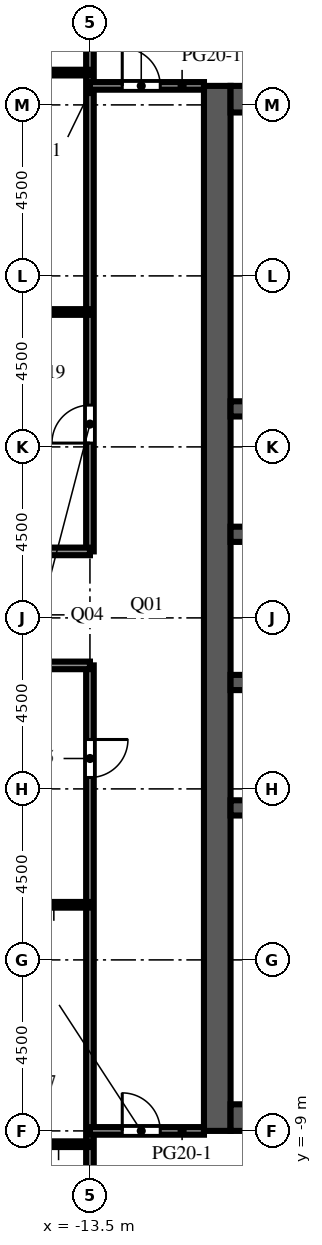
"""IFC4 building model, lengths in metres.
Left out: names, types, materials, properties, quantities, classifications, styles, units other than length and angle.
Written with IfcOpenShell. Run it as: python <this file> out.ifc"""

import sys

from ifc_helpers import new_model, si_unit, direction, frame, frame_2d, origin, place, context, subcontext, project, spatial, rectangle, extrude, element, fill, save


model = new_model("IFC4")
c1 = context("Model", 3, precision=1e-05, world=origin(), true_north=direction((0.0, 1.0)))
c2 = subcontext(c1, "Body", "Model", "MODEL_VIEW")
j1 = project(units=[si_unit("LENGTHUNIT", "METRE"), si_unit("PLANEANGLEUNIT", "RADIAN")], contexts=[c1])
p1 = place(None, origin())
s1 = spatial("IfcSite", under=j1, at=p1, CompositionType="ELEMENT")
p2 = place(p1, origin())
s2 = spatial("IfcBuilding", under=s1, at=p2, CompositionType="ELEMENT")
p3 = place(p2, frame((0.0, 0.0, 231.6)))
s3 = spatial("IfcBuildingStorey", under=s2, at=p3, CompositionType="ELEMENT", Elevation=231.6)
p4 = place(p3, frame((-10.15, -9.0, 0.0), z_axis=(0.0, 0.0, 1.0), x_axis=(0.0, 1.0, 0.0)))
e1 = element("IfcWall", 1, at=p4, inside=s3, PredefinedType="SHEAR", context=c2, shape_type="SweptSolid", body=[
    extrude(rectangle(XDim=27.5, YDim=0.7, at=frame_2d((13.75, 0.0))), origin(), (0.0, 0.0, 1.0), 4.1),
])
p5 = place(p4, frame((12.55, 0.0, 0.0)))
e2 = element("IfcOpeningElement", 2, at=p5, cuts=e1, PredefinedType="OPENING", context=c2, shape_type="SweptSolid", body=[
    extrude(rectangle(XDim=2.4, YDim=2.4, at=frame_2d((1.2, 1.2))), frame((0.0, 0.36, 0.0), z_axis=(0.0, -1.0, 0.0), x_axis=(1.0, 0.0, 0.0)), (0.0, 0.0, 1.0), 0.72),
])
p6 = place(p4, frame((6.825, 0.0, 0.0)))
e3 = element("IfcOpeningElement", 3, at=p6, cuts=e1, PredefinedType="OPENING", context=c2, shape_type="SweptSolid", body=[
    extrude(rectangle(XDim=1.2, YDim=2.1, at=frame_2d((0.6, 1.05))), frame((0.0, 0.36, 0.0), z_axis=(0.0, -1.0, 0.0), x_axis=(1.0, 0.0, 0.0)), (0.0, 0.0, 1.0), 0.72),
])
p7 = place(p4, frame((19.475, 0.0, 0.0)))
e4 = element("IfcOpeningElement", 4, at=p7, cuts=e1, PredefinedType="OPENING", context=c2, shape_type="SweptSolid", body=[
    extrude(rectangle(XDim=1.2, YDim=2.1, at=frame_2d((0.6, 1.05))), frame((0.0, 0.36, 0.0), z_axis=(0.0, -1.0, 0.0), x_axis=(1.0, 0.0, 0.0)), (0.0, 0.0, 1.0), 0.72),
])
for number, where, z_axis, x_axis in (
    (5, (-9.8, -8.65, 0.0), (0.0, 0.0, 1.0), (1.0, 0.0, 0.0)),
    (6, (-9.8, 18.15, 0.0), (0.0, 0.0, 1.0), (1.0, 0.0, 0.0)),
):
    element("IfcWall", number, at=place(p3, frame(where, z_axis=z_axis, x_axis=x_axis)), inside=s3, PredefinedType="SHEAR", context=c2, shape_type="SweptSolid", body=[
        extrude(rectangle(XDim=10.6, YDim=0.7, at=frame_2d((5.3, 0.0))), origin(), (0.0, 0.0, 1.0), 4.1),
    ])
p8 = place(p3, frame((-9.8, -0.5, 0.0), z_axis=(0.0, 0.0, 1.0), x_axis=(1.0, 0.0, 0.0)))
e7 = element("IfcWall", 7, at=p8, inside=s3, PredefinedType="SHEAR", context=c2, shape_type="SweptSolid", body=[
    extrude(rectangle(XDim=10.6, YDim=0.4, at=frame_2d((5.3, 0.0))), origin(), (0.0, 0.0, 1.0), 4.1),
])
p9 = place(p3, frame((-9.8, 2.8, 0.0), z_axis=(0.0, 0.0, 1.0), x_axis=(1.0, 0.0, 0.0)))
e8 = element("IfcWall", 8, at=p9, inside=s3, PredefinedType="SHEAR", context=c2, shape_type="SweptSolid", body=[
    extrude(rectangle(XDim=10.6, YDim=0.4, at=frame_2d((5.3, 0.0))), origin(), (0.0, 0.0, 1.0), 4.1),
])
p10 = place(p9, frame((0.688, 0.0, 0.0)))
e9 = element("IfcOpeningElement", 9, at=p10, cuts=e8, PredefinedType="OPENING", context=c2, shape_type="SweptSolid", body=[
    extrude(rectangle(XDim=1.1, YDim=2.1, at=frame_2d((0.55, 1.05))), frame((0.0, 0.21, 0.0), z_axis=(0.0, -1.0, 0.0), x_axis=(1.0, 0.0, 0.0)), (0.0, 0.0, 1.0), 0.42),
])
p11 = place(p9, frame((3.438, 0.0, 0.0)))
e10 = element("IfcOpeningElement", 10, at=p11, cuts=e8, PredefinedType="OPENING", context=c2, shape_type="SweptSolid", body=[
    extrude(rectangle(XDim=1.1, YDim=2.1, at=frame_2d((0.55, 1.05))), frame((0.0, 0.21, 0.0), z_axis=(0.0, -1.0, 0.0), x_axis=(1.0, 0.0, 0.0)), (0.0, 0.0, 1.0), 0.42),
])
p12 = place(p9, frame((6.113, 0.0, 0.0)))
e11 = element("IfcOpeningElement", 11, at=p12, cuts=e8, PredefinedType="OPENING", context=c2, shape_type="SweptSolid", body=[
    extrude(rectangle(XDim=1.0, YDim=2.1, at=frame_2d((0.5, 1.05))), frame((0.0, 0.21, 0.0), z_axis=(0.0, -1.0, 0.0), x_axis=(1.0, 0.0, 0.0)), (0.0, 0.0, 1.0), 0.42),
])
p13 = place(p9, frame((8.863, 0.0, 0.0)))
e12 = element("IfcOpeningElement", 12, at=p13, cuts=e8, PredefinedType="OPENING", context=c2, shape_type="SweptSolid", body=[
    extrude(rectangle(XDim=1.0, YDim=2.1, at=frame_2d((0.5, 1.05))), frame((0.0, 0.21, 0.0), z_axis=(0.0, -1.0, 0.0), x_axis=(1.0, 0.0, 0.0)), (0.0, 0.0, 1.0), 0.42),
])
p14 = place(p3, frame((-9.8, 6.7, 0.0), z_axis=(0.0, 0.0, 1.0), x_axis=(1.0, 0.0, 0.0)))
e13 = element("IfcWall", 13, at=p14, inside=s3, PredefinedType="SHEAR", context=c2, shape_type="SweptSolid", body=[
    extrude(rectangle(XDim=10.6, YDim=0.4, at=frame_2d((5.3, 0.0))), origin(), (0.0, 0.0, 1.0), 4.1),
])
p15 = place(p14, frame((3.438, 0.0, 0.0)))
e14 = element("IfcOpeningElement", 14, at=p15, cuts=e13, PredefinedType="OPENING", context=c2, shape_type="SweptSolid", body=[
    extrude(rectangle(XDim=1.1, YDim=2.1, at=frame_2d((0.55, 1.05))), frame((0.0, 0.21, 0.0), z_axis=(0.0, -1.0, 0.0), x_axis=(1.0, 0.0, 0.0)), (0.0, 0.0, 1.0), 0.42),
])
p16 = place(p14, frame((6.062, 0.0, 0.0)))
e15 = element("IfcOpeningElement", 15, at=p16, cuts=e13, PredefinedType="OPENING", context=c2, shape_type="SweptSolid", body=[
    extrude(rectangle(XDim=1.1, YDim=2.1, at=frame_2d((0.55, 1.05))), frame((0.0, 0.21, 0.0), z_axis=(0.0, -1.0, 0.0), x_axis=(1.0, 0.0, 0.0)), (0.0, 0.0, 1.0), 0.42),
])
p17 = place(p14, frame((8.812, 0.0, 0.0)))
e16 = element("IfcOpeningElement", 16, at=p17, cuts=e13, PredefinedType="OPENING", context=c2, shape_type="SweptSolid", body=[
    extrude(rectangle(XDim=1.1, YDim=2.1, at=frame_2d((0.55, 1.05))), frame((0.0, 0.21, 0.0), z_axis=(0.0, -1.0, 0.0), x_axis=(1.0, 0.0, 0.0)), (0.0, 0.0, 1.0), 0.42),
])
p18 = place(p14, frame((0.738, 0.0, 0.0)))
e17 = element("IfcOpeningElement", 17, at=p18, cuts=e13, PredefinedType="OPENING", context=c2, shape_type="SweptSolid", body=[
    extrude(rectangle(XDim=1.0, YDim=2.1, at=frame_2d((0.5, 1.05))), frame((0.0, 0.21, 0.0), z_axis=(0.0, -1.0, 0.0), x_axis=(1.0, 0.0, 0.0)), (0.0, 0.0, 1.0), 0.42),
])
p19 = place(p3, frame((-9.8, 10.0, 0.0), z_axis=(0.0, 0.0, 1.0), x_axis=(1.0, 0.0, 0.0)))
e18 = element("IfcWall", 18, at=p19, inside=s3, PredefinedType="SHEAR", context=c2, shape_type="SweptSolid", body=[
    extrude(rectangle(XDim=10.6, YDim=0.4, at=frame_2d((5.3, 0.0))), origin(), (0.0, 0.0, 1.0), 4.1),
])
p20 = place(p3, frame((-13.5, -22.077, 0.0), z_axis=(0.0, 0.0, 1.0), x_axis=(0.0, 1.0, 0.0)))
e19 = element("IfcWall", 19, at=p20, inside=s3, PredefinedType="PARTITIONING", context=c2, shape_type="SweptSolid", body=[
    extrude(rectangle(XDim=25.327, YDim=0.2, at=frame_2d((12.664, 0.0))), origin(), (0.0, 0.0, 1.0), 3.65),
])
p21 = place(p20, frame((22.377, 0.0, 0.0)))
e20 = element("IfcOpeningElement", 20, at=p21, cuts=e19, PredefinedType="OPENING", context=c2, shape_type="SweptSolid", body=[
    extrude(rectangle(XDim=1.0, YDim=2.1, at=frame_2d((0.5, 1.05))), frame((0.0, 0.11, 0.0), z_axis=(0.0, -1.0, 0.0), x_axis=(1.0, 0.0, 0.0)), (0.0, 0.0, 1.0), 0.22),
])
p22 = place(p3, frame((-13.5, 6.25, 0.0), z_axis=(0.0, 0.0, 1.0), x_axis=(0.0, 1.0, 0.0)))
e21 = element("IfcWall", 21, at=p22, inside=s3, PredefinedType="PARTITIONING", context=c2, shape_type="SweptSolid", body=[
    extrude(rectangle(XDim=20.35, YDim=0.2, at=frame_2d((10.175, 0.0))), origin(), (0.0, 0.0, 1.0), 3.65),
])
p23 = place(p22, frame((2.85, 0.0, 0.0)))
e22 = element("IfcOpeningElement", 22, at=p23, cuts=e21, PredefinedType="OPENING", context=c2, shape_type="SweptSolid", body=[
    extrude(rectangle(XDim=1.0, YDim=2.1, at=frame_2d((0.5, 1.05))), frame((0.0, 0.11, 0.0), z_axis=(0.0, -1.0, 0.0), x_axis=(1.0, 0.0, 0.0)), (0.0, 0.0, 1.0), 0.22),
])
p24 = place(p3, frame((-13.5, -9.35, 0.0), z_axis=(0.0, 0.0, 1.0), x_axis=(-1.0, 0.0, 0.0)))
e23 = element("IfcWall", 23, at=p24, inside=s3, PredefinedType="PARTITIONING", context=c2, shape_type="SweptSolid", body=[
    extrude(rectangle(XDim=4.1, YDim=0.15, at=frame_2d((2.05, 0.0))), origin(), (0.0, 0.0, 1.0), 3.65),
])
p25 = place(p24, frame((1.65, 0.0, 0.0)))
e24 = element("IfcOpeningElement", 24, at=p25, cuts=e23, PredefinedType="OPENING", context=c2, shape_type="SweptSolid", body=[
    extrude(rectangle(XDim=1.0, YDim=2.1, at=frame_2d((0.5, 1.05))), frame((0.0, 0.085, 0.0), z_axis=(0.0, -1.0, 0.0), x_axis=(1.0, 0.0, 0.0)), (0.0, 0.0, 1.0), 0.17),
])
p26 = place(p3, frame((-10.5, -9.0, 0.0), z_axis=(0.0, 0.0, 1.0), x_axis=(-1.0, 0.0, 0.0)))
e25 = element("IfcWall", 25, at=p26, inside=s3, PredefinedType="PARTITIONING", context=c2, shape_type="SweptSolid", body=[
    extrude(rectangle(XDim=3.0, YDim=0.2, at=frame_2d((1.5, 0.0))), origin(), (0.0, 0.0, 1.0), 3.65),
])
p27 = place(p26, frame((1.15, 0.0, 0.0)))
e26 = element("IfcOpeningElement", 26, at=p27, cuts=e25, PredefinedType="OPENING", context=c2, shape_type="SweptSolid", body=[
    extrude(rectangle(XDim=1.0, YDim=2.1, at=frame_2d((0.5, 1.05))), frame((0.0, 0.11, 0.0), z_axis=(0.0, -1.0, 0.0), x_axis=(1.0, 0.0, 0.0)), (0.0, 0.0, 1.0), 0.22),
])
p28 = place(p3, frame((-13.5, -3.05, 0.0), z_axis=(0.0, 0.0, 1.0), x_axis=(-1.0, 0.0, 0.0)))
e27 = element("IfcWall", 27, at=p28, inside=s3, PredefinedType="PARTITIONING", context=c2, shape_type="SweptSolid", body=[
    extrude(rectangle(XDim=4.35, YDim=0.15, at=frame_2d((2.175, 0.0))), origin(), (0.0, 0.0, 1.0), 3.65),
])
p29 = place(p28, frame((1.9, 0.0, 0.0)))
e28 = element("IfcOpeningElement", 28, at=p29, cuts=e27, PredefinedType="OPENING", context=c2, shape_type="SweptSolid", body=[
    extrude(rectangle(XDim=1.0, YDim=2.1, at=frame_2d((0.5, 1.05))), frame((0.0, 0.085, 0.0), z_axis=(0.0, -1.0, 0.0), x_axis=(1.0, 0.0, 0.0)), (0.0, 0.0, 1.0), 0.17),
])
for number, where, z_axis, x_axis in (
    (29, (-17.85, 3.25, 0.0), (0.0, 0.0, 1.0), (1.0, 0.0, 0.0)),
    (30, (-17.85, 6.25, 0.0), (0.0, 0.0, 1.0), (1.0, 0.0, 0.0)),
):
    element("IfcWall", number, at=place(p3, frame(where, z_axis=z_axis, x_axis=x_axis)), inside=s3, PredefinedType="PARTITIONING", context=c2, shape_type="SweptSolid", body=[
        extrude(rectangle(XDim=4.35, YDim=0.2, at=frame_2d((2.175, 0.0))), origin(), (0.0, 0.0, 1.0), 3.65),
    ])
p30 = place(p3, frame((-17.85, 12.55, 0.0), z_axis=(0.0, 0.0, 1.0), x_axis=(1.0, 0.0, 0.0)))
e31 = element("IfcWall", 31, at=p30, inside=s3, PredefinedType="PARTITIONING", context=c2, shape_type="SweptSolid", body=[
    extrude(rectangle(XDim=4.35, YDim=0.15, at=frame_2d((2.175, 0.0))), origin(), (0.0, 0.0, 1.0), 3.65),
])
p31 = place(p30, frame((1.95, 0.0, 0.0)))
e32 = element("IfcOpeningElement", 32, at=p31, cuts=e31, PredefinedType="OPENING", context=c2, shape_type="SweptSolid", body=[
    extrude(rectangle(XDim=1.0, YDim=2.1, at=frame_2d((0.5, 1.05))), frame((0.0, 0.085, 0.0), z_axis=(0.0, -1.0, 0.0), x_axis=(1.0, 0.0, 0.0)), (0.0, 0.0, 1.0), 0.17),
])
p32 = place(p3, frame((-13.5, 18.5, 0.0), z_axis=(0.0, 0.0, 1.0), x_axis=(1.0, 0.0, 0.0)))
e33 = element("IfcWall", 33, at=p32, inside=s3, PredefinedType="PARTITIONING", context=c2, shape_type="SweptSolid", body=[
    extrude(rectangle(XDim=3.0, YDim=0.2, at=frame_2d((1.5, 0.0))), origin(), (0.0, 0.0, 1.0), 3.65),
])
p33 = place(p32, frame((0.85, 0.0, 0.0)))
e34 = element("IfcOpeningElement", 34, at=p33, cuts=e33, PredefinedType="OPENING", context=c2, shape_type="SweptSolid", body=[
    extrude(rectangle(XDim=1.0, YDim=2.1, at=frame_2d((0.5, 1.05))), frame((0.0, 0.11, 0.0), z_axis=(0.0, -1.0, 0.0), x_axis=(1.0, 0.0, 0.0)), (0.0, 0.0, 1.0), 0.22),
])
p34 = place(p3, frame((-17.85, 18.85, 0.0), z_axis=(0.0, 0.0, 1.0), x_axis=(1.0, 0.0, 0.0)))
e35 = element("IfcWall", 35, at=p34, inside=s3, PredefinedType="PARTITIONING", context=c2, shape_type="SweptSolid", body=[
    extrude(rectangle(XDim=4.35, YDim=0.15, at=frame_2d((2.175, 0.0))), origin(), (0.0, 0.0, 1.0), 3.65),
])
p35 = place(p34, frame((1.2, 0.0, 0.0)))
e36 = element("IfcOpeningElement", 36, at=p35, cuts=e35, PredefinedType="OPENING", context=c2, shape_type="SweptSolid", body=[
    extrude(rectangle(XDim=1.0, YDim=2.1, at=frame_2d((0.5, 1.05))), frame((0.0, 0.085, 0.0), z_axis=(0.0, -1.0, 0.0), x_axis=(1.0, 0.0, 0.0)), (0.0, 0.0, 1.0), 0.17),
])
p36 = place(p5, origin())
e37 = element("IfcDoor", 37, at=p36, inside=s3, OperationType="DOUBLE_DOOR_DOUBLE_SWING", PredefinedType="DOOR", context=c2, shape_type="SweptSolid", body=[
    extrude(rectangle(XDim=2.4, YDim=2.4, at=frame_2d((1.2, 1.2))), frame((0.0, 0.025, 0.0), z_axis=(0.0, -1.0, 0.0), x_axis=(1.0, 0.0, 0.0)), (0.0, 0.0, 1.0), 0.05),
])
fill(e2, e37)
p37 = place(p6, origin())
e38 = element("IfcDoor", 38, at=p37, inside=s3, OperationType="SINGLE_SWING_LEFT", PredefinedType="DOOR", context=c2, shape_type="SweptSolid", body=[
    extrude(rectangle(XDim=1.2, YDim=2.1, at=frame_2d((0.6, 1.05))), frame((0.0, 0.025, 0.0), z_axis=(0.0, -1.0, 0.0), x_axis=(1.0, 0.0, 0.0)), (0.0, 0.0, 1.0), 0.05),
])
fill(e3, e38)
p38 = place(p7, origin())
e39 = element("IfcDoor", 39, at=p38, inside=s3, OperationType="SINGLE_SWING_LEFT", PredefinedType="DOOR", context=c2, shape_type="SweptSolid", body=[
    extrude(rectangle(XDim=1.2, YDim=2.1, at=frame_2d((0.6, 1.05))), frame((0.0, 0.025, 0.0), z_axis=(0.0, -1.0, 0.0), x_axis=(1.0, 0.0, 0.0)), (0.0, 0.0, 1.0), 0.05),
])
fill(e4, e39)
p39 = place(p21, origin())
e40 = element("IfcDoor", 40, at=p39, inside=s3, OperationType="SINGLE_SWING_RIGHT", PredefinedType="DOOR", context=c2, shape_type="SweptSolid", body=[
    extrude(rectangle(XDim=1.0, YDim=2.1, at=frame_2d((0.5, 1.05))), frame((0.0, 0.025, 0.0), z_axis=(0.0, -1.0, 0.0), x_axis=(1.0, 0.0, 0.0)), (0.0, 0.0, 1.0), 0.05),
])
fill(e20, e40)
p40 = place(p23, origin())
e41 = element("IfcDoor", 41, at=p40, inside=s3, OperationType="SINGLE_SWING_LEFT", PredefinedType="DOOR", context=c2, shape_type="SweptSolid", body=[
    extrude(rectangle(XDim=1.0, YDim=2.1, at=frame_2d((0.5, 1.05))), frame((0.0, 0.025, 0.0), z_axis=(0.0, -1.0, 0.0), x_axis=(1.0, 0.0, 0.0)), (0.0, 0.0, 1.0), 0.05),
])
fill(e22, e41)
p41 = place(p27, origin())
e42 = element("IfcDoor", 42, at=p41, inside=s3, OperationType="SINGLE_SWING_RIGHT", PredefinedType="DOOR", context=c2, shape_type="SweptSolid", body=[
    extrude(rectangle(XDim=1.0, YDim=2.1, at=frame_2d((0.5, 1.05))), frame((0.0, 0.025, 0.0), z_axis=(0.0, -1.0, 0.0), x_axis=(1.0, 0.0, 0.0)), (0.0, 0.0, 1.0), 0.05),
])
fill(e26, e42)
p42 = place(p33, origin())
e43 = element("IfcDoor", 43, at=p42, inside=s3, OperationType="SINGLE_SWING_LEFT", PredefinedType="DOOR", context=c2, shape_type="SweptSolid", body=[
    extrude(rectangle(XDim=1.0, YDim=2.1, at=frame_2d((0.5, 1.05))), frame((0.0, 0.025, 0.0), z_axis=(0.0, -1.0, 0.0), x_axis=(1.0, 0.0, 0.0)), (0.0, 0.0, 1.0), 0.05),
])
fill(e34, e43)
save(model, sys.argv[1])
